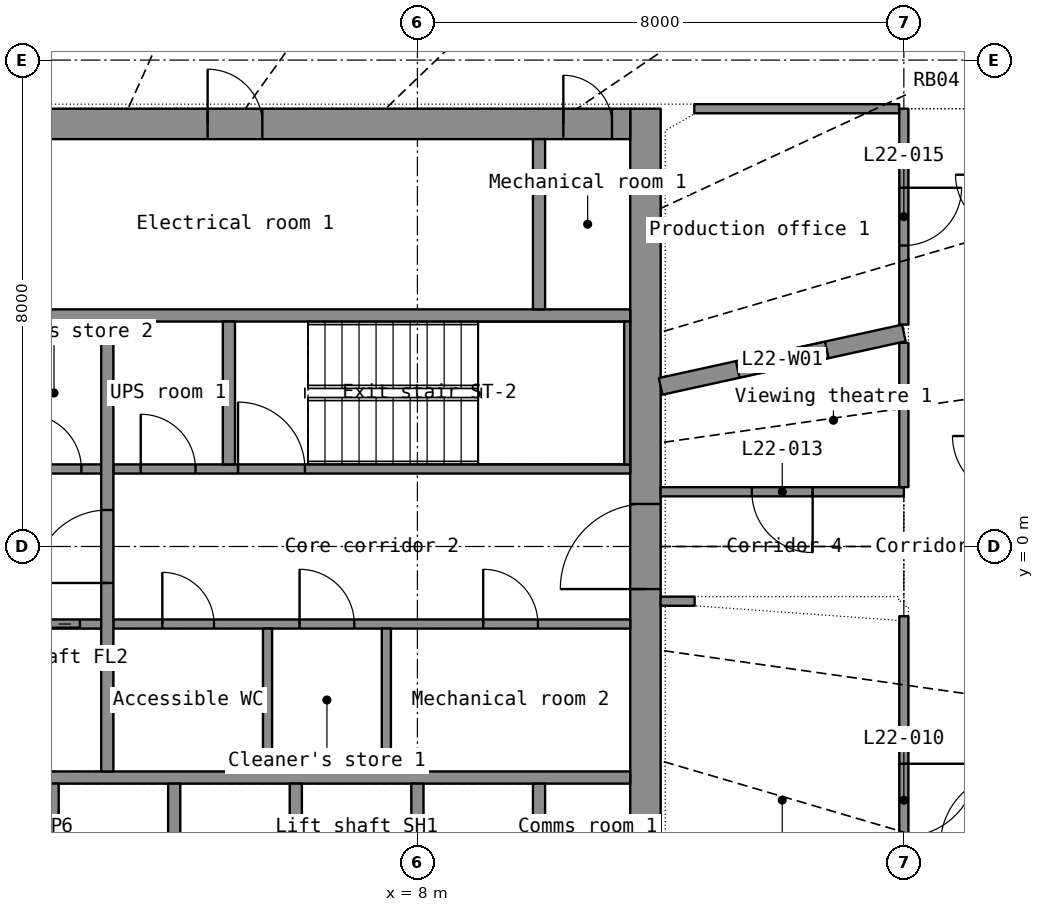
"""IFC4 building model, lengths in metres.
Left out: names, types, materials, properties, quantities, classifications, styles, units other than length and angle.
Written with IfcOpenShell. Run it as: python <this file> out.ifc"""

import sys

from ifc_helpers import new_model, si_unit, direction, frame, frame_2d, origin, place, context, subcontext, project, spatial, rectangle, extrude, element, fill, save


model = new_model("IFC4")
c1 = context("Model", 3, precision=1e-05, world=origin(), true_north=direction((0.0, 1.0)))
c2 = subcontext(c1, "Body", "Model", "MODEL_VIEW")
j1 = project(units=[si_unit("LENGTHUNIT", "METRE"), si_unit("PLANEANGLEUNIT", "RADIAN")], contexts=[c1])
p1 = place(None, origin())
s1 = spatial("IfcSite", under=j1, at=p1, CompositionType="ELEMENT")
p2 = place(p1, origin())
s2 = spatial("IfcBuilding", under=s1, at=p2, CompositionType="ELEMENT")
p3 = place(p2, frame((0.0, 0.0, 97.1)))
s3 = spatial("IfcBuildingStorey", under=s2, at=p3, CompositionType="ELEMENT", Elevation=97.1)
p4 = place(p3, frame((11.75, -7.2, 0.0), z_axis=(0.0, 0.0, 1.0), x_axis=(0.0, 1.0, 0.0)))
e1 = element("IfcWall", 1, at=p4, inside=s3, PredefinedType="SHEAR", context=c2, shape_type="SweptSolid", body=[
    extrude(rectangle(XDim=14.4, YDim=0.5, at=frame_2d((7.2, 0.0))), origin(), (0.0, 0.0, 1.0), 3.3),
])
p5 = place(p4, frame((6.5, 0.0, 0.0)))
e2 = element("IfcOpeningElement", 2, at=p5, cuts=e1, PredefinedType="OPENING", context=c2, shape_type="SweptSolid", body=[
    extrude(rectangle(XDim=1.4, YDim=2.2, at=frame_2d((0.7, 1.1))), frame((0.0, 0.26, 0.0), z_axis=(0.0, -1.0, 0.0), x_axis=(1.0, 0.0, 0.0)), (0.0, 0.0, 1.0), 0.52),
])
p6 = place(p3, frame((-11.5, 6.95, 0.0), z_axis=(0.0, 0.0, 1.0), x_axis=(1.0, 0.0, 0.0)))
e3 = element("IfcWall", 3, at=p6, inside=s3, PredefinedType="SHEAR", context=c2, shape_type="SweptSolid", body=[
    extrude(rectangle(XDim=23.0, YDim=0.5, at=frame_2d((11.5, 0.0))), origin(), (0.0, 0.0, 1.0), 3.3),
])
p7 = place(p6, frame((1.95, 0.0, 0.0)))
e4 = element("IfcOpeningElement", 4, at=p7, cuts=e3, PredefinedType="OPENING", context=c2, shape_type="SweptSolid", body=[
    extrude(rectangle(XDim=1.1, YDim=2.2, at=frame_2d((0.55, 1.1))), frame((0.0, 0.26, 0.0), z_axis=(0.0, -1.0, 0.0), x_axis=(1.0, 0.0, 0.0)), (0.0, 0.0, 1.0), 0.52),
])
p8 = place(p6, frame((8.05, 0.0, 0.0)))
e5 = element("IfcOpeningElement", 5, at=p8, cuts=e3, PredefinedType="OPENING", context=c2, shape_type="SweptSolid", body=[
    extrude(rectangle(XDim=0.9, YDim=2.1, at=frame_2d((0.45, 1.05))), frame((0.0, 0.26, 0.0), z_axis=(0.0, -1.0, 0.0), x_axis=(1.0, 0.0, 0.0)), (0.0, 0.0, 1.0), 0.52),
])
p9 = place(p6, frame((16.05, 0.0, 0.0)))
e6 = element("IfcOpeningElement", 6, at=p9, cuts=e3, PredefinedType="OPENING", context=c2, shape_type="SweptSolid", body=[
    extrude(rectangle(XDim=0.9, YDim=2.1, at=frame_2d((0.45, 1.05))), frame((0.0, 0.26, 0.0), z_axis=(0.0, -1.0, 0.0), x_axis=(1.0, 0.0, 0.0)), (0.0, 0.0, 1.0), 0.52),
])
p10 = place(p6, frame((0.3, 0.0, 0.0)))
e7 = element("IfcOpeningElement", 7, at=p10, cuts=e3, PredefinedType="OPENING", context=c2, shape_type="SweptSolid", body=[
    extrude(rectangle(XDim=0.8, YDim=2.05, at=frame_2d((0.4, 1.025))), frame((0.0, 0.26, 0.0), z_axis=(0.0, -1.0, 0.0), x_axis=(1.0, 0.0, 0.0)), (0.0, 0.0, 1.0), 0.52),
])
p11 = place(p6, frame((21.9, 0.0, 0.0)))
e8 = element("IfcOpeningElement", 8, at=p11, cuts=e3, PredefinedType="OPENING", context=c2, shape_type="SweptSolid", body=[
    extrude(rectangle(XDim=0.8, YDim=2.05, at=frame_2d((0.4, 1.025))), frame((0.0, 0.26, 0.0), z_axis=(0.0, -1.0, 0.0), x_axis=(1.0, 0.0, 0.0)), (0.0, 0.0, 1.0), 0.52),
])
for number, where, z_axis, x_axis in (
    (9, (-11.5, -3.8, 0.0), (0.0, 0.0, 1.0), (1.0, 0.0, 0.0)),
    (10, (-11.5, 3.8, 0.0), (0.0, 0.0, 1.0), (1.0, 0.0, 0.0)),
):
    element("IfcWall", number, at=place(p3, frame(where, z_axis=z_axis, x_axis=x_axis)), inside=s3, PredefinedType="SHEAR", context=c2, shape_type="SweptSolid", body=[
        extrude(rectangle(XDim=23.0, YDim=0.2, at=frame_2d((11.5, 0.0))), origin(), (0.0, 0.0, 1.0), 3.3),
    ])
for number, where, z_axis, x_axis in (
    (11, (2.0, -6.7, 0.0), (0.0, 0.0, 1.0), (0.0, 1.0, 0.0)),
    (12, (4.0, -6.7, 0.0), (0.0, 0.0, 1.0), (0.0, 1.0, 0.0)),
    (13, (6.0, -6.7, 0.0), (0.0, 0.0, 1.0), (0.0, 1.0, 0.0)),
    (14, (8.0, -6.7, 0.0), (0.0, 0.0, 1.0), (0.0, 1.0, 0.0)),
    (15, (10.0, -6.7, 0.0), (0.0, 0.0, 1.0), (0.0, 1.0, 0.0)),
    (16, (10.0, 3.9, 0.0), (0.0, 0.0, 1.0), (0.0, 1.0, 0.0)),
):
    element("IfcWall", number, at=place(p3, frame(where, z_axis=z_axis, x_axis=x_axis)), inside=s3, PredefinedType="SHEAR", context=c2, shape_type="SweptSolid", body=[
        extrude(rectangle(XDim=2.8, YDim=0.2, at=frame_2d((1.4, 0.0))), origin(), (0.0, 0.0, 1.0), 3.3),
    ])
p12 = place(p3, frame((-2.8, -1.275, 0.0), z_axis=(0.0, 0.0, 1.0), x_axis=(1.0, 0.0, 0.0)))
e17 = element("IfcWall", 17, at=p12, inside=s3, PredefinedType="SHEAR", context=c2, shape_type="SweptSolid", body=[
    extrude(rectangle(XDim=5.6, YDim=0.15, at=frame_2d((2.8, 0.0))), origin(), (0.0, 0.0, 1.0), 3.3),
])
p13 = place(p12, frame((4.15, 0.0, 0.0)))
e18 = element("IfcOpeningElement", 18, at=p13, cuts=e17, PredefinedType="OPENING", context=c2, shape_type="SweptSolid", body=[
    extrude(rectangle(XDim=1.1, YDim=2.2, at=frame_2d((0.55, 1.1))), frame((0.0, 0.085, 0.0), z_axis=(0.0, -1.0, 0.0), x_axis=(1.0, 0.0, 0.0)), (0.0, 0.0, 1.0), 0.17),
])
p14 = place(p12, frame((0.326, 0.0, 0.0)))
e19 = element("IfcOpeningElement", 19, at=p14, cuts=e17, PredefinedType="OPENING", context=c2, shape_type="SweptSolid", body=[
    extrude(rectangle(XDim=0.9, YDim=2.1, at=frame_2d((0.45, 1.05))), frame((0.0, 0.085, 0.0), z_axis=(0.0, -1.0, 0.0), x_axis=(1.0, 0.0, 0.0)), (0.0, 0.0, 1.0), 0.17),
])
p15 = place(p12, frame((2.201, 0.0, 0.0)))
e20 = element("IfcOpeningElement", 20, at=p15, cuts=e17, PredefinedType="OPENING", context=c2, shape_type="SweptSolid", body=[
    extrude(rectangle(XDim=0.9, YDim=2.1, at=frame_2d((0.45, 1.05))), frame((0.0, 0.085, 0.0), z_axis=(0.0, -1.0, 0.0), x_axis=(1.0, 0.0, 0.0)), (0.0, 0.0, 1.0), 0.17),
])
p16 = place(p3, frame((3.0, -1.275, 0.0), z_axis=(0.0, 0.0, 1.0), x_axis=(1.0, 0.0, 0.0)))
e21 = element("IfcWall", 21, at=p16, inside=s3, PredefinedType="PARTITIONING", context=c2, shape_type="SweptSolid", body=[
    extrude(rectangle(XDim=8.5, YDim=0.15, at=frame_2d((4.25, 0.0))), origin(), (0.0, 0.0, 1.0), 3.3),
])
p17 = place(p16, frame((0.805, 0.0, 0.0)))
e22 = element("IfcOpeningElement", 22, at=p17, cuts=e21, PredefinedType="OPENING", context=c2, shape_type="SweptSolid", body=[
    extrude(rectangle(XDim=0.85, YDim=2.1, at=frame_2d((0.425, 1.05))), frame((0.0, 0.085, 0.0), z_axis=(0.0, -1.0, 0.0), x_axis=(1.0, 0.0, 0.0)), (0.0, 0.0, 1.0), 0.17),
])
p18 = place(p16, frame((3.062, 0.0, 0.0)))
e23 = element("IfcOpeningElement", 23, at=p18, cuts=e21, PredefinedType="OPENING", context=c2, shape_type="SweptSolid", body=[
    extrude(rectangle(XDim=0.9, YDim=2.1, at=frame_2d((0.45, 1.05))), frame((0.0, 0.085, 0.0), z_axis=(0.0, -1.0, 0.0), x_axis=(1.0, 0.0, 0.0)), (0.0, 0.0, 1.0), 0.17),
])
p19 = place(p16, frame((6.082, 0.0, 0.0)))
e24 = element("IfcOpeningElement", 24, at=p19, cuts=e21, PredefinedType="OPENING", context=c2, shape_type="SweptSolid", body=[
    extrude(rectangle(XDim=0.9, YDim=2.1, at=frame_2d((0.45, 1.05))), frame((0.0, 0.085, 0.0), z_axis=(0.0, -1.0, 0.0), x_axis=(1.0, 0.0, 0.0)), (0.0, 0.0, 1.0), 0.17),
])
p20 = place(p3, frame((-2.8, 1.275, 0.0), z_axis=(0.0, 0.0, 1.0), x_axis=(1.0, 0.0, 0.0)))
e25 = element("IfcWall", 25, at=p20, inside=s3, PredefinedType="SHEAR", context=c2, shape_type="SweptSolid", body=[
    extrude(rectangle(XDim=5.6, YDim=0.15, at=frame_2d((2.8, 0.0))), origin(), (0.0, 0.0, 1.0), 3.3),
])
p21 = place(p20, frame((0.35, 0.0, 0.0)))
e26 = element("IfcOpeningElement", 26, at=p21, cuts=e25, PredefinedType="OPENING", context=c2, shape_type="SweptSolid", body=[
    extrude(rectangle(XDim=1.1, YDim=2.2, at=frame_2d((0.55, 1.1))), frame((0.0, 0.085, 0.0), z_axis=(0.0, -1.0, 0.0), x_axis=(1.0, 0.0, 0.0)), (0.0, 0.0, 1.0), 0.17),
])
p22 = place(p20, frame((2.499, 0.0, 0.0)))
e27 = element("IfcOpeningElement", 27, at=p22, cuts=e25, PredefinedType="OPENING", context=c2, shape_type="SweptSolid", body=[
    extrude(rectangle(XDim=0.9, YDim=2.1, at=frame_2d((0.45, 1.05))), frame((0.0, 0.085, 0.0), z_axis=(0.0, -1.0, 0.0), x_axis=(1.0, 0.0, 0.0)), (0.0, 0.0, 1.0), 0.17),
])
p23 = place(p20, frame((4.374, 0.0, 0.0)))
e28 = element("IfcOpeningElement", 28, at=p23, cuts=e25, PredefinedType="OPENING", context=c2, shape_type="SweptSolid", body=[
    extrude(rectangle(XDim=0.9, YDim=2.1, at=frame_2d((0.45, 1.05))), frame((0.0, 0.085, 0.0), z_axis=(0.0, -1.0, 0.0), x_axis=(1.0, 0.0, 0.0)), (0.0, 0.0, 1.0), 0.17),
])
p24 = place(p3, frame((3.0, 1.275, 0.0), z_axis=(0.0, 0.0, 1.0), x_axis=(1.0, 0.0, 0.0)))
e29 = element("IfcWall", 29, at=p24, inside=s3, PredefinedType="SHEAR", context=c2, shape_type="SweptSolid", body=[
    extrude(rectangle(XDim=8.5, YDim=0.15, at=frame_2d((4.25, 0.0))), origin(), (0.0, 0.0, 1.0), 3.3),
])
p25 = place(p24, frame((2.05, 0.0, 0.0)))
e30 = element("IfcOpeningElement", 30, at=p25, cuts=e29, PredefinedType="OPENING", context=c2, shape_type="SweptSolid", body=[
    extrude(rectangle(XDim=1.1, YDim=2.15, at=frame_2d((0.55, 1.075))), frame((0.0, 0.085, 0.0), z_axis=(0.0, -1.0, 0.0), x_axis=(1.0, 0.0, 0.0)), (0.0, 0.0, 1.0), 0.17),
])
p26 = place(p24, frame((0.45, 0.0, 0.0)))
e31 = element("IfcOpeningElement", 31, at=p26, cuts=e29, PredefinedType="OPENING", context=c2, shape_type="SweptSolid", body=[
    extrude(rectangle(XDim=0.9, YDim=2.1, at=frame_2d((0.45, 1.05))), frame((0.0, 0.085, 0.0), z_axis=(0.0, -1.0, 0.0), x_axis=(1.0, 0.0, 0.0)), (0.0, 0.0, 1.0), 0.17),
])
p27 = place(p3, frame((2.9, -3.7, 0.0), z_axis=(0.0, 0.0, 1.0), x_axis=(0.0, 1.0, 0.0)))
e32 = element("IfcWall", 32, at=p27, inside=s3, PredefinedType="SHEAR", context=c2, shape_type="SweptSolid", body=[
    extrude(rectangle(XDim=7.4, YDim=0.2, at=frame_2d((3.7, 0.0))), origin(), (0.0, 0.0, 1.0), 3.3),
])
p28 = place(p27, frame((3.1, 0.0, 0.0)))
e33 = element("IfcOpeningElement", 33, at=p28, cuts=e32, PredefinedType="OPENING", context=c2, shape_type="SweptSolid", body=[
    extrude(rectangle(XDim=1.2, YDim=2.2, at=frame_2d((0.6, 1.1))), frame((0.0, 0.11, 0.0), z_axis=(0.0, -1.0, 0.0), x_axis=(1.0, 0.0, 0.0)), (0.0, 0.0, 1.0), 0.22),
])
p29 = place(p3, frame((11.45, 1.35, 0.0), z_axis=(0.0, 0.0, 1.0), x_axis=(0.0, 1.0, 0.0)))
e34 = element("IfcWall", 34, at=p29, inside=s3, PredefinedType="SHEAR", context=c2, shape_type="SweptSolid", body=[
    extrude(rectangle(XDim=2.35, YDim=0.1, at=frame_2d((1.175, 0.0))), origin(), (0.0, 0.0, 1.0), 3.3),
])
p30 = place(p3, frame((4.9, 1.35, 0.0), z_axis=(0.0, 0.0, 1.0), x_axis=(0.0, 1.0, 0.0)))
e35 = element("IfcWall", 35, at=p30, inside=s3, PredefinedType="SHEAR", context=c2, shape_type="SweptSolid", body=[
    extrude(rectangle(XDim=2.35, YDim=0.2, at=frame_2d((1.175, 0.0))), origin(), (0.0, 0.0, 1.0), 3.3),
])
for number, where, z_axis, x_axis in (
    (36, (5.535, -3.7, 0.0), (0.0, 0.0, 1.0), (0.0, 1.0, 0.0)),
    (37, (7.489, -3.7, 0.0), (0.0, 0.0, 1.0), (0.0, 1.0, 0.0)),
):
    element("IfcWall", number, at=place(p3, frame(where, z_axis=z_axis, x_axis=x_axis)), inside=s3, PredefinedType="PARTITIONING", context=c2, shape_type="SweptSolid", body=[
        extrude(rectangle(XDim=2.35, YDim=0.15, at=frame_2d((1.175, 0.0))), origin(), (0.0, 0.0, 1.0), 3.3),
    ])
p31 = place(p3, frame((16.0, -1.146, 0.0), z_axis=(0.0, 0.0, 1.0), x_axis=(0.0, -1.0, 0.0)))
e38 = element("IfcWall", 38, at=p31, inside=s3, PredefinedType="PARTITIONING", context=c2, shape_type="SweptSolid", body=[
    extrude(rectangle(XDim=6.053, YDim=0.15, at=frame_2d((3.027, 0.0))), origin(), (0.0, 0.0, 1.0), 2.4),
])
p32 = place(p31, frame((2.427, 0.0, 0.0)))
e39 = element("IfcOpeningElement", 39, at=p32, cuts=e38, PredefinedType="OPENING", context=c2, shape_type="SweptSolid", body=[
    extrude(rectangle(XDim=1.2, YDim=2.2, at=frame_2d((0.6, 1.1))), frame((0.0, 0.085, 0.0), z_axis=(0.0, -1.0, 0.0), x_axis=(1.0, 0.0, 0.0)), (0.0, 0.0, 1.0), 0.17),
])
p33 = place(p3, frame((16.0, 3.512, 0.0), z_axis=(0.0, 0.0, 1.0), x_axis=(-0.976750433, -0.214379551, 0.0)))
e40 = element("IfcWall", 40, at=p33, inside=s3, PredefinedType="PARTITIONING", context=c2, shape_type="SweptSolid", body=[
    extrude(rectangle(XDim=4.095, YDim=0.28, at=frame_2d((2.048, 0.0))), origin(), (0.0, 0.0, 1.0), 2.4),
])
p34 = place(p33, frame((1.298, 0.0, 1.0)))
e41 = element("IfcOpeningElement", 41, at=p34, cuts=e40, PredefinedType="OPENING", context=c2, shape_type="SweptSolid", body=[
    extrude(rectangle(XDim=1.5, YDim=1.2, at=frame_2d((0.75, 0.6))), frame((0.0, 0.15, 0.0), z_axis=(0.0, -1.0, 0.0), x_axis=(1.0, 0.0, 0.0)), (0.0, 0.0, 1.0), 0.3),
])
p35 = place(p3, frame((16.0, 0.9, 0.0), z_axis=(0.0, 0.0, 1.0), x_axis=(-1.0, 0.0, 0.0)))
e42 = element("IfcWall", 42, at=p35, inside=s3, PredefinedType="PARTITIONING", context=c2, shape_type="SweptSolid", body=[
    extrude(rectangle(XDim=4.0, YDim=0.15, at=frame_2d((2.0, 0.0))), origin(), (0.0, 0.0, 1.0), 2.4),
])
p36 = place(p35, frame((1.5, 0.0, 0.0)))
e43 = element("IfcOpeningElement", 43, at=p36, cuts=e42, PredefinedType="OPENING", context=c2, shape_type="SweptSolid", body=[
    extrude(rectangle(XDim=1.0, YDim=2.2, at=frame_2d((0.5, 1.1))), frame((0.0, 0.085, 0.0), z_axis=(0.0, -1.0, 0.0), x_axis=(1.0, 0.0, 0.0)), (0.0, 0.0, 1.0), 0.17),
])
p37 = place(p3, frame((16.0, 7.2, 0.0), z_axis=(0.0, 0.0, 1.0), x_axis=(0.0, -1.0, 0.0)))
e44 = element("IfcWall", 44, at=p37, inside=s3, PredefinedType="PARTITIONING", context=c2, shape_type="SweptSolid", body=[
    extrude(rectangle(XDim=3.55, YDim=0.15, at=frame_2d((1.775, 0.0))), origin(), (0.0, 0.0, 1.0), 2.4),
])
p38 = place(p37, frame((1.3, 0.0, 0.0)))
e45 = element("IfcOpeningElement", 45, at=p38, cuts=e44, PredefinedType="OPENING", context=c2, shape_type="SweptSolid", body=[
    extrude(rectangle(XDim=0.95, YDim=2.15, at=frame_2d((0.475, 1.075))), frame((0.0, 0.085, 0.0), z_axis=(0.0, -1.0, 0.0), x_axis=(1.0, 0.0, 0.0)), (0.0, 0.0, 1.0), 0.17),
])
p39 = place(p3, frame((12.553, 7.2, 0.0), z_axis=(0.0, 0.0, 1.0), x_axis=(1.0, 0.0, 0.0)))
e46 = element("IfcWall", 46, at=p39, inside=s3, PredefinedType="PARTITIONING", context=c2, shape_type="SweptSolid", body=[
    extrude(rectangle(XDim=3.37, YDim=0.15, at=frame_2d((1.685, 0.0))), origin(), (0.0, 0.0, 1.0), 2.4),
])
p40 = place(p3, frame((16.0, 3.35, 0.0), z_axis=(0.0, 0.0, 1.0), x_axis=(0.0, -1.0, 0.0)))
e47 = element("IfcWall", 47, at=p40, inside=s3, PredefinedType="PARTITIONING", context=c2, shape_type="SweptSolid", body=[
    extrude(rectangle(XDim=2.373, YDim=0.15, at=frame_2d((1.187, 0.0))), origin(), (0.0, 0.0, 1.0), 2.4),
])
p41 = place(p3, frame((12.0, -0.9, 0.0), z_axis=(0.0, 0.0, 1.0), x_axis=(1.0, 0.0, 0.0)))
e48 = element("IfcWall", 48, at=p41, inside=s3, PredefinedType="PARTITIONING", context=c2, shape_type="SweptSolid", body=[
    extrude(rectangle(XDim=0.559, YDim=0.15, at=frame_2d((0.279, 0.0))), origin(), (0.0, 0.0, 1.0), 2.4),
])
p42 = place(p9, origin())
e49 = element("IfcDoor", 49, at=p42, inside=s3, OperationType="SINGLE_SWING_LEFT", PredefinedType="DOOR", context=c2, shape_type="SweptSolid", body=[
    extrude(rectangle(XDim=0.9, YDim=2.1, at=frame_2d((0.45, 1.05))), frame((0.0, 0.025, 0.0), z_axis=(0.0, -1.0, 0.0), x_axis=(1.0, 0.0, 0.0)), (0.0, 0.0, 1.0), 0.05),
])
fill(e6, e49)
p43 = place(p11, origin())
e50 = element("IfcDoor", 50, at=p43, inside=s3, OperationType="SINGLE_SWING_LEFT", PredefinedType="DOOR", context=c2, shape_type="SweptSolid", body=[
    extrude(rectangle(XDim=0.8, YDim=2.05, at=frame_2d((0.4, 1.025))), frame((0.0, 0.025, 0.0), z_axis=(0.0, -1.0, 0.0), x_axis=(1.0, 0.0, 0.0)), (0.0, 0.0, 1.0), 0.05),
])
fill(e8, e50)
p44 = place(p5, origin())
e51 = element("IfcDoor", 51, at=p44, inside=s3, OperationType="DOUBLE_DOOR_SINGLE_SWING", PredefinedType="DOOR", context=c2, shape_type="SweptSolid", body=[
    extrude(rectangle(XDim=1.4, YDim=2.2, at=frame_2d((0.7, 1.1))), frame((0.0, 0.025, 0.0), z_axis=(0.0, -1.0, 0.0), x_axis=(1.0, 0.0, 0.0)), (0.0, 0.0, 1.0), 0.05),
])
fill(e2, e51)
p45 = place(p28, origin())
e52 = element("IfcDoor", 52, at=p45, inside=s3, OperationType="SINGLE_SWING_LEFT", PredefinedType="DOOR", context=c2, shape_type="SweptSolid", body=[
    extrude(rectangle(XDim=1.2, YDim=2.2, at=frame_2d((0.6, 1.1))), frame((0.0, 0.025, 0.0), z_axis=(0.0, -1.0, 0.0), x_axis=(1.0, 0.0, 0.0)), (0.0, 0.0, 1.0), 0.05),
])
fill(e33, e52)
p46 = place(p13, origin())
e53 = element("IfcDoor", 53, at=p46, inside=s3, OperationType="DOUBLE_DOOR_SLIDING", PredefinedType="DOOR", context=c2, shape_type="SweptSolid", body=[
    extrude(rectangle(XDim=1.1, YDim=2.2, at=frame_2d((0.55, 1.1))), frame((0.0, 0.025, 0.0), z_axis=(0.0, -1.0, 0.0), x_axis=(1.0, 0.0, 0.0)), (0.0, 0.0, 1.0), 0.05),
])
fill(e18, e53)
p47 = place(p25, origin())
e54 = element("IfcDoor", 54, at=p47, inside=s3, OperationType="SINGLE_SWING_LEFT", PredefinedType="DOOR", context=c2, shape_type="SweptSolid", body=[
    extrude(rectangle(XDim=1.1, YDim=2.15, at=frame_2d((0.55, 1.075))), frame((0.0, 0.025, 0.0), z_axis=(0.0, -1.0, 0.0), x_axis=(1.0, 0.0, 0.0)), (0.0, 0.0, 1.0), 0.05),
])
fill(e30, e54)
p48 = place(p17, origin())
e55 = element("IfcDoor", 55, at=p48, inside=s3, OperationType="SINGLE_SWING_LEFT", PredefinedType="DOOR", context=c2, shape_type="SweptSolid", body=[
    extrude(rectangle(XDim=0.85, YDim=2.1, at=frame_2d((0.425, 1.05))), frame((0.0, 0.025, 0.0), z_axis=(0.0, -1.0, 0.0), x_axis=(1.0, 0.0, 0.0)), (0.0, 0.0, 1.0), 0.05),
])
fill(e22, e55)
p49 = place(p18, origin())
e56 = element("IfcDoor", 56, at=p49, inside=s3, OperationType="SINGLE_SWING_LEFT", PredefinedType="DOOR", context=c2, shape_type="SweptSolid", body=[
    extrude(rectangle(XDim=0.9, YDim=2.1, at=frame_2d((0.45, 1.05))), frame((0.0, 0.025, 0.0), z_axis=(0.0, -1.0, 0.0), x_axis=(1.0, 0.0, 0.0)), (0.0, 0.0, 1.0), 0.05),
])
fill(e23, e56)
p50 = place(p19, origin())
e57 = element("IfcDoor", 57, at=p50, inside=s3, OperationType="SINGLE_SWING_LEFT", PredefinedType="DOOR", context=c2, shape_type="SweptSolid", body=[
    extrude(rectangle(XDim=0.9, YDim=2.1, at=frame_2d((0.45, 1.05))), frame((0.0, 0.025, 0.0), z_axis=(0.0, -1.0, 0.0), x_axis=(1.0, 0.0, 0.0)), (0.0, 0.0, 1.0), 0.05),
])
fill(e24, e57)
p51 = place(p23, origin())
e58 = element("IfcDoor", 58, at=p51, inside=s3, OperationType="SINGLE_SWING_LEFT", PredefinedType="DOOR", context=c2, shape_type="SweptSolid", body=[
    extrude(rectangle(XDim=0.9, YDim=2.1, at=frame_2d((0.45, 1.05))), frame((0.0, 0.025, 0.0), z_axis=(0.0, -1.0, 0.0), x_axis=(1.0, 0.0, 0.0)), (0.0, 0.0, 1.0), 0.05),
])
fill(e28, e58)
p52 = place(p26, origin())
e59 = element("IfcDoor", 59, at=p52, inside=s3, OperationType="SINGLE_SWING_LEFT", PredefinedType="DOOR", context=c2, shape_type="SweptSolid", body=[
    extrude(rectangle(XDim=0.9, YDim=2.1, at=frame_2d((0.45, 1.05))), frame((0.0, 0.025, 0.0), z_axis=(0.0, -1.0, 0.0), x_axis=(1.0, 0.0, 0.0)), (0.0, 0.0, 1.0), 0.05),
])
fill(e31, e59)
p53 = place(p32, origin())
e60 = element("IfcDoor", 60, at=p53, inside=s3, OperationType="DOUBLE_DOOR_SINGLE_SWING", PredefinedType="DOOR", context=c2, shape_type="SweptSolid", body=[
    extrude(rectangle(XDim=1.2, YDim=2.2, at=frame_2d((0.6, 1.1))), frame((0.0, 0.025, 0.0), z_axis=(0.0, -1.0, 0.0), x_axis=(1.0, 0.0, 0.0)), (0.0, 0.0, 1.0), 0.05),
])
fill(e39, e60)
p54 = place(p36, origin())
e61 = element("IfcDoor", 61, at=p54, inside=s3, OperationType="SINGLE_SWING_LEFT", PredefinedType="DOOR", context=c2, shape_type="SweptSolid", body=[
    extrude(rectangle(XDim=1.0, YDim=2.2, at=frame_2d((0.5, 1.1))), frame((0.0, 0.025, 0.0), z_axis=(0.0, -1.0, 0.0), x_axis=(1.0, 0.0, 0.0)), (0.0, 0.0, 1.0), 0.05),
])
fill(e43, e61)
p55 = place(p38, origin())
e62 = element("IfcDoor", 62, at=p55, inside=s3, OperationType="SINGLE_SWING_LEFT", PredefinedType="DOOR", context=c2, shape_type="SweptSolid", body=[
    extrude(rectangle(XDim=0.95, YDim=2.15, at=frame_2d((0.475, 1.075))), frame((0.0, 0.025, 0.0), z_axis=(0.0, -1.0, 0.0), x_axis=(1.0, 0.0, 0.0)), (0.0, 0.0, 1.0), 0.05),
])
fill(e45, e62)
p56 = place(p34, origin())
e63 = element("IfcWindow", 63, at=p56, inside=s3, PartitioningType="SINGLE_PANEL", PredefinedType="WINDOW", context=c2, shape_type="SweptSolid", body=[
    extrude(rectangle(XDim=1.5, YDim=1.2, at=frame_2d((0.75, 0.6))), frame((0.0, 0.03, 0.0), z_axis=(0.0, -1.0, 0.0), x_axis=(1.0, 0.0, 0.0)), (0.0, 0.0, 1.0), 0.06),
])
fill(e41, e63)
save(model, sys.argv[1])
